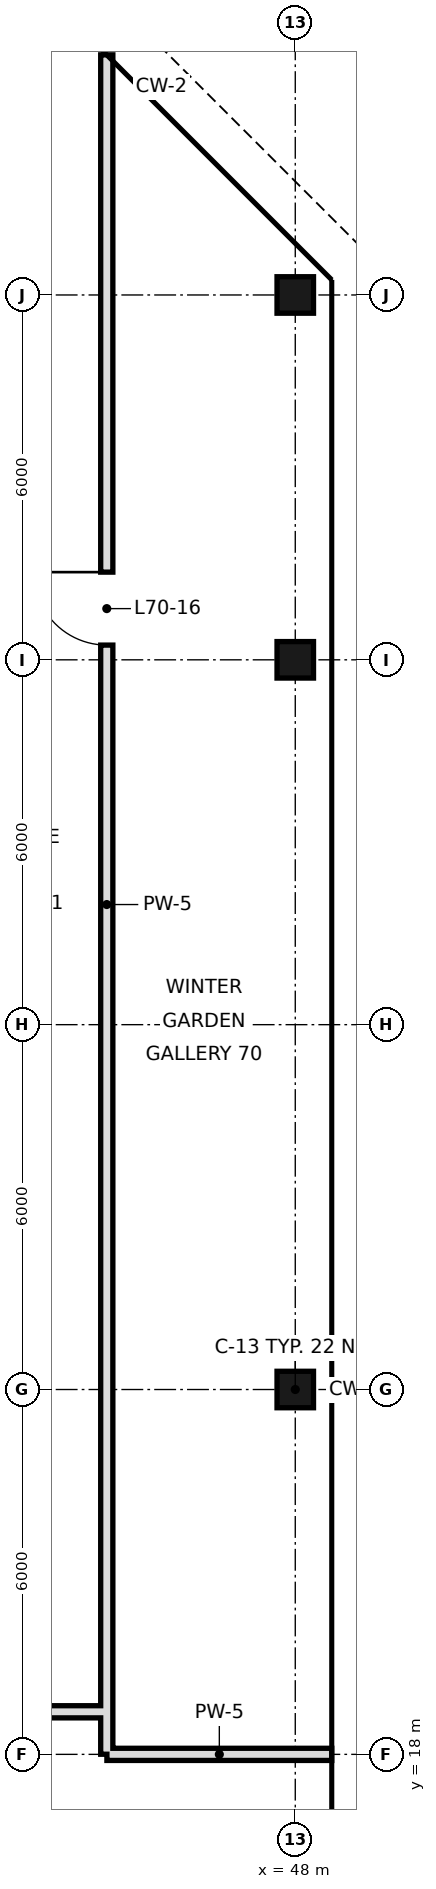
"""IFC4 building model, lengths in metres.
Left out: names, types, materials, properties, quantities, classifications, styles, units other than length and angle.
Written with IfcOpenShell. Run it as: python <this file> out.ifc"""

import sys

from ifc_helpers import new_model, si_unit, direction, frame, frame_2d, origin, origin_2d, place, context, subcontext, project, spatial, rectangle, hollow_rectangle, extrude, element, fill, save


model = new_model("IFC4")
c1 = context("Model", 3, precision=1e-05, world=origin(), true_north=direction((0.0, 1.0)))
c2 = subcontext(c1, "Body", "Model", "MODEL_VIEW")
j1 = project(units=[si_unit("LENGTHUNIT", "METRE"), si_unit("PLANEANGLEUNIT", "RADIAN")], contexts=[c1])
p1 = place(None, origin())
s1 = spatial("IfcSite", under=j1, at=p1, CompositionType="ELEMENT")
p2 = place(p1, origin())
s2 = spatial("IfcBuilding", under=s1, at=p2, CompositionType="ELEMENT")
p3 = place(p2, frame((0.0, 0.0, 298.0)))
s3 = spatial("IfcBuildingStorey", under=s2, at=p3, CompositionType="ELEMENT", Elevation=298.0)
for number, where, z_axis, x_axis in (
    (1, (48.0, 24.0, 0.0), (0.0, 0.0, 1.0), (1.0, 0.0, 0.0)),
    (2, (48.0, 36.0, 0.0), (0.0, 0.0, 1.0), (1.0, 0.0, 0.0)),
    (3, (48.0, 42.0, 0.0), (0.0, 0.0, 1.0), (1.0, 0.0, 0.0)),
):
    element("IfcColumn", number, at=place(p3, frame(where, z_axis=z_axis, x_axis=x_axis)), inside=s3, PredefinedType="COLUMN", context=c2, shape_type="SweptSolid", body=[
        extrude(hollow_rectangle(XDim=0.6, YDim=0.6, WallThickness=0.028, at=origin_2d()), origin(), (0.0, 0.0, 1.0), 3.6),
    ])
p4 = place(p3, frame((44.9, 18.002, 0.0), z_axis=(0.0, 0.0, 1.0), x_axis=(0.0, 1.0, 0.0)))
e4 = element("IfcWall", 4, at=p4, inside=s3, PredefinedType="SOLIDWALL", context=c2, shape_type="SweptSolid", body=[
    extrude(rectangle(XDim=27.947, YDim=0.2, at=frame_2d((13.974, 0.0))), origin(), (0.0, 0.0, 1.0), 2.97),
])
p5 = place(p4, frame((18.24, 0.0, 0.0)))
e5 = element("IfcOpeningElement", 5, at=p5, cuts=e4, PredefinedType="OPENING", context=c2, shape_type="SweptSolid", body=[
    extrude(rectangle(XDim=1.2, YDim=2.4, at=frame_2d((0.6, 1.2))), frame((0.0, 0.11, 0.0), z_axis=(0.0, -1.0, 0.0), x_axis=(1.0, 0.0, 0.0)), (0.0, 0.0, 1.0), 0.22),
])
p6 = place(p3, frame((44.902, 18.0, 0.0), z_axis=(0.0, 0.0, 1.0), x_axis=(1.0, 0.0, 0.0)))
e6 = element("IfcWall", 6, at=p6, inside=s3, PredefinedType="SOLIDWALL", context=c2, shape_type="SweptSolid", body=[
    extrude(rectangle(XDim=3.698, YDim=0.2, at=frame_2d((1.849, 0.0))), origin(), (0.0, 0.0, 1.0), 2.72),
])
p7 = place(p3, frame((3.1, 18.7, 0.0), z_axis=(0.0, 0.0, 1.0), x_axis=(1.0, 0.0, 0.0)))
e7 = element("IfcWall", 7, at=p7, inside=s3, PredefinedType="SOLIDWALL", context=c2, shape_type="SweptSolid", body=[
    extrude(rectangle(XDim=41.8, YDim=0.2, at=frame_2d((20.9, 0.0))), origin(), (0.0, 0.0, 1.0), 2.72),
])
p8 = place(p7, frame((6.55, 0.0, 0.0)))
e8 = element("IfcOpeningElement", 8, at=p8, cuts=e7, PredefinedType="OPENING", context=c2, shape_type="SweptSolid", body=[
    extrude(rectangle(XDim=1.8, YDim=2.4, at=frame_2d((0.9, 1.2))), frame((0.0, 0.11, 0.0), z_axis=(0.0, -1.0, 0.0), x_axis=(1.0, 0.0, 0.0)), (0.0, 0.0, 1.0), 0.22),
])
p9 = place(p7, frame((22.53, 0.0, 0.0)))
e9 = element("IfcOpeningElement", 9, at=p9, cuts=e7, PredefinedType="OPENING", context=c2, shape_type="SweptSolid", body=[
    extrude(rectangle(XDim=1.8, YDim=2.4, at=frame_2d((0.9, 1.2))), frame((0.0, 0.11, 0.0), z_axis=(0.0, -1.0, 0.0), x_axis=(1.0, 0.0, 0.0)), (0.0, 0.0, 1.0), 0.22),
])
p10 = place(p5, frame((1.2, 0.0, 0.0), z_axis=(0.0, 0.0, 1.0), x_axis=(-1.0, 0.0, 0.0)))
e10 = element("IfcDoor", 10, at=p10, inside=s3, OperationType="SINGLE_SWING_LEFT", PredefinedType="DOOR", context=c2, shape_type="SweptSolid", body=[
    extrude(rectangle(XDim=1.2, YDim=2.4, at=frame_2d((0.6, 1.2))), frame((0.0, 0.025, 0.0), z_axis=(0.0, -1.0, 0.0), x_axis=(1.0, 0.0, 0.0)), (0.0, 0.0, 1.0), 0.05),
])
fill(e5, e10)
save(model, sys.argv[1])
